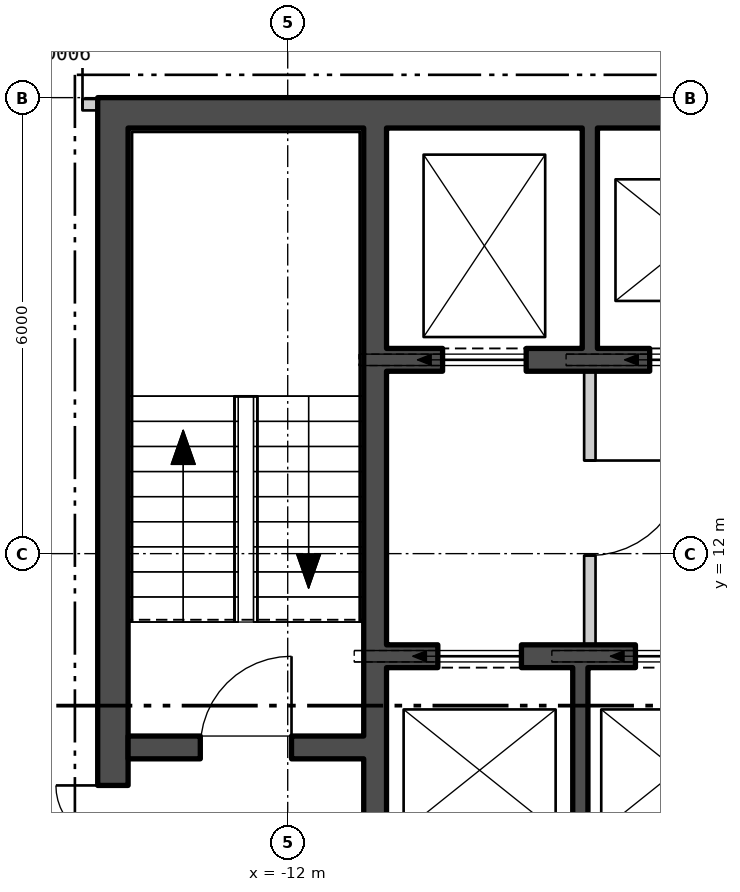
"""IFC4 building model, lengths in metres.
Left out: names, types, materials, properties, quantities, classifications, styles, units other than length and angle.
Written with IfcOpenShell. Run it as: python <this file> out.ifc"""

import sys

from ifc_helpers import new_model, si_unit, direction, frame, frame_2d, origin, place, context, subcontext, project, spatial, polyline, rectangle, outline, extrude, element, fill, save


model = new_model("IFC4")
c1 = context("Model", 3, precision=1e-05, world=origin(), true_north=direction((0.0, 1.0)))
c2 = subcontext(c1, "Body", "Model", "MODEL_VIEW")
j1 = project(units=[si_unit("LENGTHUNIT", "METRE"), si_unit("PLANEANGLEUNIT", "RADIAN")], contexts=[c1])
p1 = place(None, origin())
s1 = spatial("IfcSite", under=j1, at=p1, CompositionType="ELEMENT")
p2 = place(p1, origin())
s2 = spatial("IfcBuilding", under=s1, at=p2, CompositionType="ELEMENT")
p3 = place(p2, frame((0.0, 0.0, 298.2)))
s3 = spatial("IfcBuildingStorey", under=s2, at=p3, CompositionType="ELEMENT", Elevation=298.2)
p4 = place(p3, frame((-25.205, 15.931, -0.28), z_axis=(0.0, 0.0, 1.0), x_axis=(0.499999764979, -0.866025539474, 0.0)))
e1 = element("IfcWall", 1, at=p4, inside=s3, PredefinedType="SOLIDWALL", context=c2, shape_type="SweptSolid", body=[
    extrude(outline(polyline([(-0.13, -0.225), (45.87, -0.225), (45.61, 0.225), (0.13, 0.225), (-0.13, -0.225)])), origin(), (0.0, 0.0, 1.0), 6.1),
])
p5 = place(p4, frame((1.424, 0.0, 1.18)))
e2 = element("IfcOpeningElement", 2, at=p5, cuts=e1, PredefinedType="OPENING", context=c2, shape_type="SweptSolid", body=[
    extrude(rectangle(XDim=2.4, YDim=4.1, at=frame_2d((1.2, 2.05))), frame((0.0, 0.235, 0.0), z_axis=(0.0, -1.0, 0.0), x_axis=(1.0, 0.0, 0.0)), (0.0, 0.0, 1.0), 0.47),
])
p6 = place(p4, frame((5.893, 0.0, 1.18)))
e3 = element("IfcOpeningElement", 3, at=p6, cuts=e1, PredefinedType="OPENING", context=c2, shape_type="SweptSolid", body=[
    extrude(rectangle(XDim=2.4, YDim=4.1, at=frame_2d((1.2, 2.05))), frame((0.0, 0.235, 0.0), z_axis=(0.0, -1.0, 0.0), x_axis=(1.0, 0.0, 0.0)), (0.0, 0.0, 1.0), 0.47),
])
p7 = place(p4, frame((10.401, 0.0, 1.18)))
e4 = element("IfcOpeningElement", 4, at=p7, cuts=e1, PredefinedType="OPENING", context=c2, shape_type="SweptSolid", body=[
    extrude(rectangle(XDim=2.4, YDim=4.1, at=frame_2d((1.2, 2.05))), frame((0.0, 0.235, 0.0), z_axis=(0.0, -1.0, 0.0), x_axis=(1.0, 0.0, 0.0)), (0.0, 0.0, 1.0), 0.47),
])
p8 = place(p4, frame((14.909, 0.0, 1.18)))
e5 = element("IfcOpeningElement", 5, at=p8, cuts=e1, PredefinedType="OPENING", context=c2, shape_type="SweptSolid", body=[
    extrude(rectangle(XDim=2.4, YDim=4.1, at=frame_2d((1.2, 2.05))), frame((0.0, 0.235, 0.0), z_axis=(0.0, -1.0, 0.0), x_axis=(1.0, 0.0, 0.0)), (0.0, 0.0, 1.0), 0.47),
])
p9 = place(p4, frame((19.416, 0.0, 1.18)))
e6 = element("IfcOpeningElement", 6, at=p9, cuts=e1, PredefinedType="OPENING", context=c2, shape_type="SweptSolid", body=[
    extrude(rectangle(XDim=2.4, YDim=4.1, at=frame_2d((1.2, 2.05))), frame((0.0, 0.235, 0.0), z_axis=(0.0, -1.0, 0.0), x_axis=(1.0, 0.0, 0.0)), (0.0, 0.0, 1.0), 0.47),
])
p10 = place(p4, frame((23.924, 0.0, 1.18)))
e7 = element("IfcOpeningElement", 7, at=p10, cuts=e1, PredefinedType="OPENING", context=c2, shape_type="SweptSolid", body=[
    extrude(rectangle(XDim=2.4, YDim=4.1, at=frame_2d((1.2, 2.05))), frame((0.0, 0.235, 0.0), z_axis=(0.0, -1.0, 0.0), x_axis=(1.0, 0.0, 0.0)), (0.0, 0.0, 1.0), 0.47),
])
p11 = place(p4, frame((28.431, 0.0, 1.18)))
e8 = element("IfcOpeningElement", 8, at=p11, cuts=e1, PredefinedType="OPENING", context=c2, shape_type="SweptSolid", body=[
    extrude(rectangle(XDim=2.4, YDim=4.1, at=frame_2d((1.2, 2.05))), frame((0.0, 0.235, 0.0), z_axis=(0.0, -1.0, 0.0), x_axis=(1.0, 0.0, 0.0)), (0.0, 0.0, 1.0), 0.47),
])
p12 = place(p4, frame((32.939, 0.0, 1.18)))
e9 = element("IfcOpeningElement", 9, at=p12, cuts=e1, PredefinedType="OPENING", context=c2, shape_type="SweptSolid", body=[
    extrude(rectangle(XDim=2.4, YDim=4.1, at=frame_2d((1.2, 2.05))), frame((0.0, 0.235, 0.0), z_axis=(0.0, -1.0, 0.0), x_axis=(1.0, 0.0, 0.0)), (0.0, 0.0, 1.0), 0.47),
])
p13 = place(p4, frame((37.447, 0.0, 1.18)))
e10 = element("IfcOpeningElement", 10, at=p13, cuts=e1, PredefinedType="OPENING", context=c2, shape_type="SweptSolid", body=[
    extrude(rectangle(XDim=2.4, YDim=4.1, at=frame_2d((1.2, 2.05))), frame((0.0, 0.235, 0.0), z_axis=(0.0, -1.0, 0.0), x_axis=(1.0, 0.0, 0.0)), (0.0, 0.0, 1.0), 0.47),
])
p14 = place(p4, frame((41.916, 0.0, 1.18)))
e11 = element("IfcOpeningElement", 11, at=p14, cuts=e1, PredefinedType="OPENING", context=c2, shape_type="SweptSolid", body=[
    extrude(rectangle(XDim=2.4, YDim=4.1, at=frame_2d((1.2, 2.05))), frame((0.0, 0.235, 0.0), z_axis=(0.0, -1.0, 0.0), x_axis=(1.0, 0.0, 0.0)), (0.0, 0.0, 1.0), 0.47),
])
p15 = place(p3, frame((-14.5, 17.8, 0.0), z_axis=(0.0, 0.0, 1.0), x_axis=(1.0, 0.0, 0.0)))
e12 = element("IfcWall", 12, at=p15, inside=s3, PredefinedType="SHEAR", context=c2, shape_type="SweptSolid", body=[
    extrude(rectangle(XDim=29.0, YDim=0.4, at=frame_2d((14.5, 0.0))), origin(), (0.0, 0.0, 1.0), 5.8),
])
p16 = place(p3, frame((-14.3, 4.4, 0.0), z_axis=(0.0, 0.0, 1.0), x_axis=(0.0, 1.0, 0.0)))
e13 = element("IfcWall", 13, at=p16, inside=s3, PredefinedType="SHEAR", context=c2, shape_type="SweptSolid", body=[
    extrude(rectangle(XDim=13.2, YDim=0.4, at=frame_2d((6.6, 0.0))), origin(), (0.0, 0.0, 1.0), 5.8),
])
p17 = place(p16, frame((3.05, 0.0, 0.0)))
e14 = element("IfcOpeningElement", 14, at=p17, cuts=e13, PredefinedType="OPENING", context=c2, shape_type="SweptSolid", body=[
    extrude(rectangle(XDim=1.5, YDim=2.1, at=frame_2d((0.75, 1.05))), frame((0.0, 0.21, 0.0), z_axis=(0.0, -1.0, 0.0), x_axis=(1.0, 0.0, 0.0)), (0.0, 0.0, 1.0), 0.42),
])
p18 = place(p3, frame((-10.85, 4.4, 0.0), z_axis=(0.0, 0.0, 1.0), x_axis=(0.0, 1.0, 0.0)))
e15 = element("IfcWall", 15, at=p18, inside=s3, PredefinedType="SHEAR", context=c2, shape_type="SweptSolid", body=[
    extrude(rectangle(XDim=13.2, YDim=0.3, at=frame_2d((6.6, 0.0))), origin(), (0.0, 0.0, 1.0), 5.8),
])
p19 = place(p18, frame((1.575, 0.0, 0.0)))
e16 = element("IfcOpeningElement", 16, at=p19, cuts=e15, PredefinedType="OPENING", context=c2, shape_type="SweptSolid", body=[
    extrude(rectangle(XDim=1.25, YDim=2.1, at=frame_2d((0.625, 1.05))), frame((0.0, 0.16, 0.0), z_axis=(0.0, -1.0, 0.0), x_axis=(1.0, 0.0, 0.0)), (0.0, 0.0, 1.0), 0.32),
])
p20 = place(p18, frame((0.4, 0.0, 0.0)))
e17 = element("IfcOpeningElement", 17, at=p20, cuts=e15, PredefinedType="OPENING", context=c2, shape_type="SweptSolid", body=[
    extrude(rectangle(XDim=0.9, YDim=2.1, at=frame_2d((0.45, 1.05))), frame((0.0, 0.16, 0.0), z_axis=(0.0, -1.0, 0.0), x_axis=(1.0, 0.0, 0.0)), (0.0, 0.0, 1.0), 0.32),
])
p21 = place(p3, frame((-14.1, 9.45, 0.0), z_axis=(0.0, 0.0, 1.0), x_axis=(1.0, 0.0, 0.0)))
e18 = element("IfcWall", 18, at=p21, inside=s3, PredefinedType="SHEAR", context=c2, shape_type="SweptSolid", body=[
    extrude(rectangle(XDim=3.1, YDim=0.3, at=frame_2d((1.55, 0.0))), origin(), (0.0, 0.0, 1.0), 5.8),
])
p22 = place(p21, frame((0.95, 0.0, 0.0)))
e19 = element("IfcOpeningElement", 19, at=p22, cuts=e18, PredefinedType="OPENING", context=c2, shape_type="SweptSolid", body=[
    extrude(rectangle(XDim=1.2, YDim=2.1, at=frame_2d((0.6, 1.05))), frame((0.0, 0.16, 0.0), z_axis=(0.0, -1.0, 0.0), x_axis=(1.0, 0.0, 0.0)), (0.0, 0.0, 1.0), 0.32),
])
p23 = place(p3, frame((-10.7, 14.55, 0.0), z_axis=(0.0, 0.0, 1.0), x_axis=(1.0, 0.0, 0.0)))
e20 = element("IfcWall", 20, at=p23, inside=s3, PredefinedType="SHEAR", context=c2, shape_type="SweptSolid", body=[
    extrude(rectangle(XDim=21.4, YDim=0.3, at=frame_2d((10.7, 0.0))), origin(), (0.0, 0.0, 1.0), 5.8),
])
p24 = place(p23, frame((0.738, 0.0, 0.0)))
e21 = element("IfcOpeningElement", 21, at=p24, cuts=e20, PredefinedType="OPENING", context=c2, shape_type="SweptSolid", body=[
    extrude(rectangle(XDim=1.1, YDim=2.1, at=frame_2d((0.55, 1.05))), frame((0.0, 0.16, 0.0), z_axis=(0.0, -1.0, 0.0), x_axis=(1.0, 0.0, 0.0)), (0.0, 0.0, 1.0), 0.32),
])
p25 = place(p23, frame((3.462, 0.0, 0.0)))
e22 = element("IfcOpeningElement", 22, at=p25, cuts=e20, PredefinedType="OPENING", context=c2, shape_type="SweptSolid", body=[
    extrude(rectangle(XDim=1.1, YDim=2.1, at=frame_2d((0.55, 1.05))), frame((0.0, 0.16, 0.0), z_axis=(0.0, -1.0, 0.0), x_axis=(1.0, 0.0, 0.0)), (0.0, 0.0, 1.0), 0.32),
])
p26 = place(p23, frame((6.138, 0.0, 0.0)))
e23 = element("IfcOpeningElement", 23, at=p26, cuts=e20, PredefinedType="OPENING", context=c2, shape_type="SweptSolid", body=[
    extrude(rectangle(XDim=1.1, YDim=2.1, at=frame_2d((0.55, 1.05))), frame((0.0, 0.16, 0.0), z_axis=(0.0, -1.0, 0.0), x_axis=(1.0, 0.0, 0.0)), (0.0, 0.0, 1.0), 0.32),
])
p27 = place(p23, frame((8.812, 0.0, 0.0)))
e24 = element("IfcOpeningElement", 24, at=p27, cuts=e20, PredefinedType="OPENING", context=c2, shape_type="SweptSolid", body=[
    extrude(rectangle(XDim=1.1, YDim=2.1, at=frame_2d((0.55, 1.05))), frame((0.0, 0.16, 0.0), z_axis=(0.0, -1.0, 0.0), x_axis=(1.0, 0.0, 0.0)), (0.0, 0.0, 1.0), 0.32),
])
p28 = place(p23, frame((19.562, 0.0, 0.0)))
e25 = element("IfcOpeningElement", 25, at=p28, cuts=e20, PredefinedType="OPENING", context=c2, shape_type="SweptSolid", body=[
    extrude(rectangle(XDim=1.1, YDim=2.1, at=frame_2d((0.55, 1.05))), frame((0.0, 0.16, 0.0), z_axis=(0.0, -1.0, 0.0), x_axis=(1.0, 0.0, 0.0)), (0.0, 0.0, 1.0), 0.32),
])
p29 = place(p23, frame((12.875, 0.0, 0.0)))
e26 = element("IfcOpeningElement", 26, at=p29, cuts=e20, PredefinedType="OPENING", context=c2, shape_type="SweptSolid", body=[
    extrude(rectangle(XDim=1.0, YDim=2.1, at=frame_2d((0.5, 1.05))), frame((0.0, 0.16, 0.0), z_axis=(0.0, -1.0, 0.0), x_axis=(1.0, 0.0, 0.0)), (0.0, 0.0, 1.0), 0.32),
])
p30 = place(p23, frame((16.887, 0.0, 0.0)))
e27 = element("IfcOpeningElement", 27, at=p30, cuts=e20, PredefinedType="OPENING", context=c2, shape_type="SweptSolid", body=[
    extrude(rectangle(XDim=1.0, YDim=2.1, at=frame_2d((0.5, 1.05))), frame((0.0, 0.16, 0.0), z_axis=(0.0, -1.0, 0.0), x_axis=(1.0, 0.0, 0.0)), (0.0, 0.0, 1.0), 0.32),
])
p31 = place(p3, frame((-10.7, 10.65, 0.0), z_axis=(0.0, 0.0, 1.0), x_axis=(1.0, 0.0, 0.0)))
e28 = element("IfcWall", 28, at=p31, inside=s3, PredefinedType="SHEAR", context=c2, shape_type="SweptSolid", body=[
    extrude(rectangle(XDim=10.3, YDim=0.3, at=frame_2d((5.15, 0.0))), origin(), (0.0, 0.0, 1.0), 5.8),
])
p32 = place(p31, frame((0.675, 0.0, 0.0)))
e29 = element("IfcOpeningElement", 29, at=p32, cuts=e28, PredefinedType="OPENING", context=c2, shape_type="SweptSolid", body=[
    extrude(rectangle(XDim=1.1, YDim=2.1, at=frame_2d((0.55, 1.05))), frame((0.0, 0.16, 0.0), z_axis=(0.0, -1.0, 0.0), x_axis=(1.0, 0.0, 0.0)), (0.0, 0.0, 1.0), 0.32),
])
p33 = place(p31, frame((3.275, 0.0, 0.0)))
e30 = element("IfcOpeningElement", 30, at=p33, cuts=e28, PredefinedType="OPENING", context=c2, shape_type="SweptSolid", body=[
    extrude(rectangle(XDim=1.1, YDim=2.1, at=frame_2d((0.55, 1.05))), frame((0.0, 0.16, 0.0), z_axis=(0.0, -1.0, 0.0), x_axis=(1.0, 0.0, 0.0)), (0.0, 0.0, 1.0), 0.32),
])
p34 = place(p31, frame((5.825, 0.0, 0.0)))
e31 = element("IfcOpeningElement", 31, at=p34, cuts=e28, PredefinedType="OPENING", context=c2, shape_type="SweptSolid", body=[
    extrude(rectangle(XDim=1.1, YDim=2.1, at=frame_2d((0.55, 1.05))), frame((0.0, 0.16, 0.0), z_axis=(0.0, -1.0, 0.0), x_axis=(1.0, 0.0, 0.0)), (0.0, 0.0, 1.0), 0.32),
])
p35 = place(p31, frame((8.425, 0.0, 0.0)))
e32 = element("IfcOpeningElement", 32, at=p35, cuts=e28, PredefinedType="OPENING", context=c2, shape_type="SweptSolid", body=[
    extrude(rectangle(XDim=1.0, YDim=2.1, at=frame_2d((0.5, 1.05))), frame((0.0, 0.16, 0.0), z_axis=(0.0, -1.0, 0.0), x_axis=(1.0, 0.0, 0.0)), (0.0, 0.0, 1.0), 0.32),
])
p36 = place(p3, frame((-8.025, 14.7, 0.0), z_axis=(0.0, 0.0, 1.0), x_axis=(0.0, 1.0, 0.0)))
e33 = element("IfcWall", 33, at=p36, inside=s3, PredefinedType="SHEAR", context=c2, shape_type="SweptSolid", body=[
    extrude(rectangle(XDim=2.9, YDim=0.2, at=frame_2d((1.45, 0.0))), origin(), (0.0, 0.0, 1.0), 5.8),
])
p37 = place(p3, frame((-8.15, 7.8, 0.0), z_axis=(0.0, 0.0, 1.0), x_axis=(0.0, 1.0, 0.0)))
e34 = element("IfcWall", 34, at=p37, inside=s3, PredefinedType="SHEAR", context=c2, shape_type="SweptSolid", body=[
    extrude(rectangle(XDim=2.7, YDim=0.2, at=frame_2d((1.35, 0.0))), origin(), (0.0, 0.0, 1.0), 5.8),
])
p38 = place(p3, frame((-8.025, 10.8, 0.0), z_axis=(0.0, 0.0, 1.0), x_axis=(0.0, 1.0, 0.0)))
e35 = element("IfcWall", 35, at=p38, inside=s3, PredefinedType="PARTITIONING", context=c2, shape_type="SweptSolid", body=[
    extrude(rectangle(XDim=3.6, YDim=0.15, at=frame_2d((1.8, 0.0))), origin(), (0.0, 0.0, 1.0), 5.8),
])
p39 = place(p38, frame((1.175, 0.0, 0.0)))
e36 = element("IfcOpeningElement", 36, at=p39, cuts=e35, PredefinedType="OPENING", context=c2, shape_type="SweptSolid", body=[
    extrude(rectangle(XDim=1.25, YDim=2.1, at=frame_2d((0.625, 1.05))), frame((0.0, 0.085, 0.0), z_axis=(0.0, -1.0, 0.0), x_axis=(1.0, 0.0, 0.0)), (0.0, 0.0, 1.0), 0.17),
])
p40 = place(p3, frame((-16.225, 17.907, 0.0), z_axis=(0.0, 0.0, 1.0), x_axis=(1.0, 0.0, 0.0)))
e37 = element("IfcWall", 37, at=p40, inside=s3, PredefinedType="PARTITIONING", context=c2, shape_type="SweptSolid", body=[
    extrude(rectangle(XDim=1.725, YDim=0.15, at=frame_2d((0.863, 0.0))), origin(), (0.0, 0.0, 1.0), 5.4),
])
p41 = place(p40, frame((0.525, 0.0, 0.0)))
e38 = element("IfcOpeningElement", 38, at=p41, cuts=e37, PredefinedType="OPENING", context=c2, shape_type="SweptSolid", body=[
    extrude(rectangle(XDim=1.0, YDim=2.1, at=frame_2d((0.5, 1.05))), frame((0.0, 0.085, 0.0), z_axis=(0.0, -1.0, 0.0), x_axis=(1.0, 0.0, 0.0)), (0.0, 0.0, 1.0), 0.17),
])
p42 = place(p24, origin())
e39 = element("IfcDoor", 39, at=p42, inside=s3, OperationType="SLIDING_TO_LEFT", PredefinedType="DOOR", context=c2, shape_type="SweptSolid", body=[
    extrude(rectangle(XDim=1.1, YDim=2.1, at=frame_2d((0.55, 1.05))), frame((0.0, 0.025, 0.0), z_axis=(0.0, -1.0, 0.0), x_axis=(1.0, 0.0, 0.0)), (0.0, 0.0, 1.0), 0.05),
])
fill(e21, e39)
p43 = place(p25, origin())
e40 = element("IfcDoor", 40, at=p43, inside=s3, OperationType="SLIDING_TO_LEFT", PredefinedType="DOOR", context=c2, shape_type="SweptSolid", body=[
    extrude(rectangle(XDim=1.1, YDim=2.1, at=frame_2d((0.55, 1.05))), frame((0.0, 0.025, 0.0), z_axis=(0.0, -1.0, 0.0), x_axis=(1.0, 0.0, 0.0)), (0.0, 0.0, 1.0), 0.05),
])
fill(e22, e40)
p44 = place(p32, origin())
e41 = element("IfcDoor", 41, at=p44, inside=s3, OperationType="SLIDING_TO_LEFT", PredefinedType="DOOR", context=c2, shape_type="SweptSolid", body=[
    extrude(rectangle(XDim=1.1, YDim=2.1, at=frame_2d((0.55, 1.05))), frame((0.0, 0.025, 0.0), z_axis=(0.0, -1.0, 0.0), x_axis=(1.0, 0.0, 0.0)), (0.0, 0.0, 1.0), 0.05),
])
fill(e29, e41)
p45 = place(p33, origin())
e42 = element("IfcDoor", 42, at=p45, inside=s3, OperationType="SLIDING_TO_LEFT", PredefinedType="DOOR", context=c2, shape_type="SweptSolid", body=[
    extrude(rectangle(XDim=1.1, YDim=2.1, at=frame_2d((0.55, 1.05))), frame((0.0, 0.025, 0.0), z_axis=(0.0, -1.0, 0.0), x_axis=(1.0, 0.0, 0.0)), (0.0, 0.0, 1.0), 0.05),
])
fill(e30, e42)
p46 = place(p39, origin())
e43 = element("IfcDoor", 43, at=p46, inside=s3, OperationType="SINGLE_SWING_RIGHT", PredefinedType="DOOR", context=c2, shape_type="SweptSolid", body=[
    extrude(rectangle(XDim=1.25, YDim=2.1, at=frame_2d((0.625, 1.05))), frame((0.0, 0.025, 0.0), z_axis=(0.0, -1.0, 0.0), x_axis=(1.0, 0.0, 0.0)), (0.0, 0.0, 1.0), 0.05),
])
fill(e36, e43)
p47 = place(p22, origin())
e44 = element("IfcDoor", 44, at=p47, inside=s3, OperationType="SINGLE_SWING_LEFT", PredefinedType="DOOR", context=c2, shape_type="SweptSolid", body=[
    extrude(rectangle(XDim=1.2, YDim=2.1, at=frame_2d((0.6, 1.05))), frame((0.0, 0.025, 0.0), z_axis=(0.0, -1.0, 0.0), x_axis=(1.0, 0.0, 0.0)), (0.0, 0.0, 1.0), 0.05),
])
fill(e19, e44)
p48 = place(p17, origin())
e45 = element("IfcDoor", 45, at=p48, inside=s3, OperationType="DOUBLE_DOOR_SINGLE_SWING", PredefinedType="DOOR", context=c2, shape_type="SweptSolid", body=[
    extrude(rectangle(XDim=1.5, YDim=2.1, at=frame_2d((0.75, 1.05))), frame((0.0, 0.025, 0.0), z_axis=(0.0, -1.0, 0.0), x_axis=(1.0, 0.0, 0.0)), (0.0, 0.0, 1.0), 0.05),
])
fill(e14, e45)
p49 = place(p41, origin())
e46 = element("IfcDoor", 46, at=p49, inside=s3, OperationType="SINGLE_SWING_LEFT", PredefinedType="DOOR", context=c2, shape_type="SweptSolid", body=[
    extrude(rectangle(XDim=1.0, YDim=2.1, at=frame_2d((0.5, 1.05))), frame((0.0, 0.025, 0.0), z_axis=(0.0, -1.0, 0.0), x_axis=(1.0, 0.0, 0.0)), (0.0, 0.0, 1.0), 0.05),
])
fill(e38, e46)
save(model, sys.argv[1])
